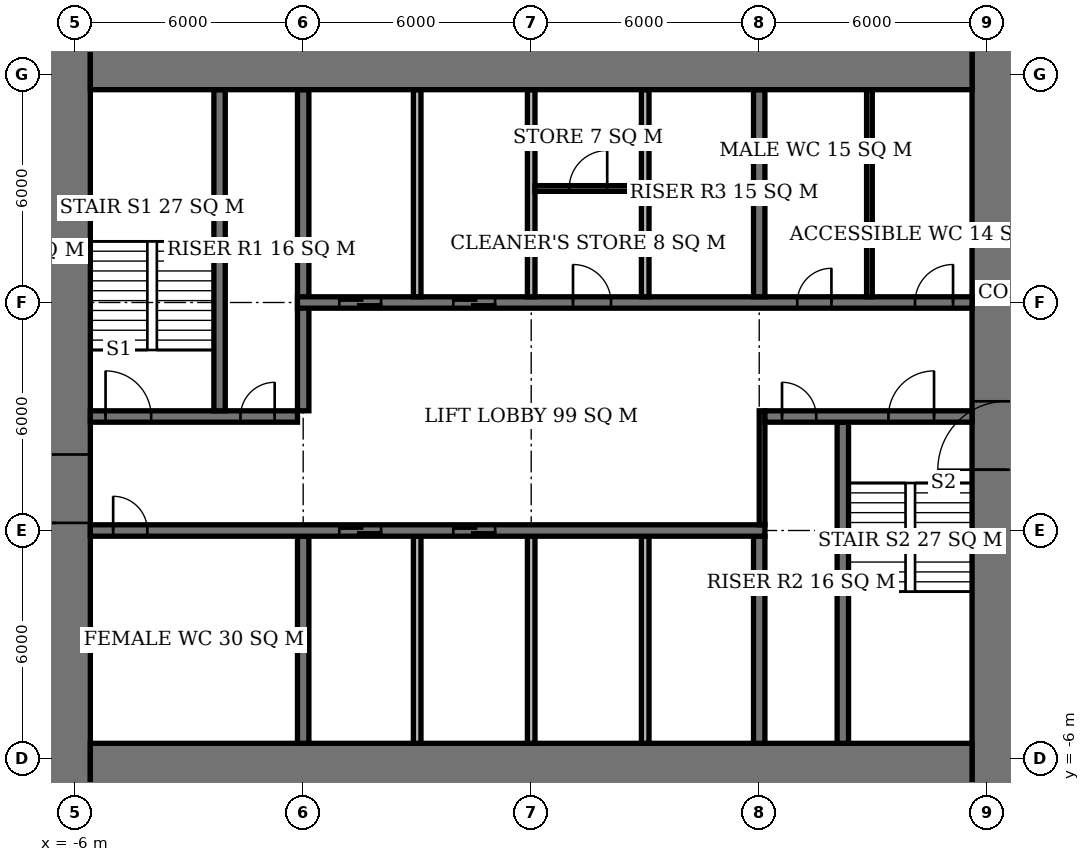
"""IFC4 building model, lengths in metres.
Left out: names, types, materials, properties, quantities, classifications, styles, units other than length and angle.
Written with IfcOpenShell. Run it as: python <this file> out.ifc"""

import sys

from ifc_helpers import new_model, si_unit, direction, frame, frame_2d, origin, place, context, subcontext, project, spatial, rectangle, extrude, element, fill, save


model = new_model("IFC4")
c1 = context("Model", 3, precision=1e-05, world=origin(), true_north=direction((0.0, 1.0)))
c2 = subcontext(c1, "Body", "Model", "MODEL_VIEW")
j1 = project(units=[si_unit("LENGTHUNIT", "METRE"), si_unit("PLANEANGLEUNIT", "RADIAN")], contexts=[c1])
p1 = place(None, origin())
s1 = spatial("IfcSite", under=j1, at=p1, CompositionType="ELEMENT")
p2 = place(p1, origin())
s2 = spatial("IfcBuilding", under=s1, at=p2, CompositionType="ELEMENT")
p3 = place(p2, frame((0.0, 0.0, 160.1)))
s3 = spatial("IfcBuildingStorey", under=s2, at=p3, CompositionType="ELEMENT", Elevation=160.1)
for number, where, z_axis, x_axis in (
    (1, (-5.6, -6.6, 0.0), (0.0, 0.0, 1.0), (1.0, 0.0, 0.0)),
    (2, (-5.6, 12.6, 0.0), (0.0, 0.0, 1.0), (1.0, 0.0, 0.0)),
):
    element("IfcWall", number, at=place(p3, frame(where, z_axis=z_axis, x_axis=x_axis)), inside=s3, PredefinedType="SHEAR", context=c2, shape_type="SweptSolid", body=[
        extrude(rectangle(XDim=23.2, YDim=2.0, at=frame_2d((11.6, 0.0))), origin(), (0.0, 0.0, 1.0), 3.9),
    ])
p4 = place(p3, frame((-6.5, -7.6, 0.0), z_axis=(0.0, 0.0, 1.0), x_axis=(0.0, 1.0, 0.0)))
e3 = element("IfcWall", 3, at=p4, inside=s3, PredefinedType="SHEAR", context=c2, shape_type="SweptSolid", body=[
    extrude(rectangle(XDim=21.2, YDim=1.8, at=frame_2d((10.6, 0.0))), origin(), (0.0, 0.0, 1.0), 3.9),
])
p5 = place(p4, frame((7.8, 0.0, 0.0)))
e4 = element("IfcOpeningElement", 4, at=p5, cuts=e3, PredefinedType="OPENING", context=c2, shape_type="SweptSolid", body=[
    extrude(rectangle(XDim=1.8, YDim=2.4, at=frame_2d((0.9, 1.2))), frame((0.0, 0.91, 0.0), z_axis=(0.0, -1.0, 0.0), x_axis=(1.0, 0.0, 0.0)), (0.0, 0.0, 1.0), 1.82),
])
p6 = place(p3, frame((18.5, -7.6, 0.0), z_axis=(0.0, 0.0, 1.0), x_axis=(0.0, 1.0, 0.0)))
e5 = element("IfcWall", 5, at=p6, inside=s3, PredefinedType="SHEAR", context=c2, shape_type="SweptSolid", body=[
    extrude(rectangle(XDim=21.2, YDim=1.8, at=frame_2d((10.6, 0.0))), origin(), (0.0, 0.0, 1.0), 3.9),
])
p7 = place(p6, frame((9.2, 0.0, 0.0)))
e6 = element("IfcOpeningElement", 6, at=p7, cuts=e5, PredefinedType="OPENING", context=c2, shape_type="SweptSolid", body=[
    extrude(rectangle(XDim=1.8, YDim=2.4, at=frame_2d((0.9, 1.2))), frame((0.0, 0.91, 0.0), z_axis=(0.0, -1.0, 0.0), x_axis=(1.0, 0.0, 0.0)), (0.0, 0.0, 1.0), 1.82),
])
p8 = place(p3, frame((-5.6, 0.0, 0.0), z_axis=(0.0, 0.0, 1.0), x_axis=(1.0, 0.0, 0.0)))
e7 = element("IfcWall", 7, at=p8, inside=s3, PredefinedType="SHEAR", context=c2, shape_type="SweptSolid", body=[
    extrude(rectangle(XDim=17.75, YDim=0.3, at=frame_2d((8.875, 0.0))), origin(), (0.0, 0.0, 1.0), 3.9),
])
p9 = place(p8, frame((0.6, 0.0, 0.0)))
e8 = element("IfcOpeningElement", 8, at=p9, cuts=e7, PredefinedType="OPENING", context=c2, shape_type="SweptSolid", body=[
    extrude(rectangle(XDim=0.9, YDim=2.1, at=frame_2d((0.45, 1.05))), frame((0.0, 0.16, 0.0), z_axis=(0.0, -1.0, 0.0), x_axis=(1.0, 0.0, 0.0)), (0.0, 0.0, 1.0), 0.32),
])
p10 = place(p8, frame((6.55, 0.0, 0.0)))
e9 = element("IfcOpeningElement", 9, at=p10, cuts=e7, PredefinedType="OPENING", context=c2, shape_type="SweptSolid", body=[
    extrude(rectangle(XDim=1.1, YDim=2.1, at=frame_2d((0.55, 1.05))), frame((0.0, 0.16, 0.0), z_axis=(0.0, -1.0, 0.0), x_axis=(1.0, 0.0, 0.0)), (0.0, 0.0, 1.0), 0.32),
])
p11 = place(p8, frame((9.55, 0.0, 0.0)))
e10 = element("IfcOpeningElement", 10, at=p11, cuts=e7, PredefinedType="OPENING", context=c2, shape_type="SweptSolid", body=[
    extrude(rectangle(XDim=1.1, YDim=2.1, at=frame_2d((0.55, 1.05))), frame((0.0, 0.16, 0.0), z_axis=(0.0, -1.0, 0.0), x_axis=(1.0, 0.0, 0.0)), (0.0, 0.0, 1.0), 0.32),
])
p12 = place(p3, frame((-5.6, 3.0, 0.0), z_axis=(0.0, 0.0, 1.0), x_axis=(1.0, 0.0, 0.0)))
e11 = element("IfcWall", 11, at=p12, inside=s3, PredefinedType="SHEAR", context=c2, shape_type="SweptSolid", body=[
    extrude(rectangle(XDim=5.45, YDim=0.3, at=frame_2d((2.725, 0.0))), origin(), (0.0, 0.0, 1.0), 3.9),
])
p13 = place(p12, frame((0.4, 0.0, 0.0)))
e12 = element("IfcOpeningElement", 12, at=p13, cuts=e11, PredefinedType="OPENING", context=c2, shape_type="SweptSolid", body=[
    extrude(rectangle(XDim=1.2, YDim=2.1, at=frame_2d((0.6, 1.05))), frame((0.0, 0.16, 0.0), z_axis=(0.0, -1.0, 0.0), x_axis=(1.0, 0.0, 0.0)), (0.0, 0.0, 1.0), 0.32),
])
p14 = place(p12, frame((3.95, 0.0, 0.0)))
e13 = element("IfcOpeningElement", 13, at=p14, cuts=e11, PredefinedType="OPENING", context=c2, shape_type="SweptSolid", body=[
    extrude(rectangle(XDim=0.9, YDim=2.1, at=frame_2d((0.45, 1.05))), frame((0.0, 0.16, 0.0), z_axis=(0.0, -1.0, 0.0), x_axis=(1.0, 0.0, 0.0)), (0.0, 0.0, 1.0), 0.32),
])
p15 = place(p3, frame((12.15, 3.0, 0.0), z_axis=(0.0, 0.0, 1.0), x_axis=(1.0, 0.0, 0.0)))
e14 = element("IfcWall", 14, at=p15, inside=s3, PredefinedType="SHEAR", context=c2, shape_type="SweptSolid", body=[
    extrude(rectangle(XDim=5.45, YDim=0.3, at=frame_2d((2.725, 0.0))), origin(), (0.0, 0.0, 1.0), 3.9),
])
p16 = place(p15, frame((3.25, 0.0, 0.0)))
e15 = element("IfcOpeningElement", 15, at=p16, cuts=e14, PredefinedType="OPENING", context=c2, shape_type="SweptSolid", body=[
    extrude(rectangle(XDim=1.2, YDim=2.1, at=frame_2d((0.6, 1.05))), frame((0.0, 0.16, 0.0), z_axis=(0.0, -1.0, 0.0), x_axis=(1.0, 0.0, 0.0)), (0.0, 0.0, 1.0), 0.32),
])
p17 = place(p15, frame((0.45, 0.0, 0.0)))
e16 = element("IfcOpeningElement", 16, at=p17, cuts=e14, PredefinedType="OPENING", context=c2, shape_type="SweptSolid", body=[
    extrude(rectangle(XDim=0.9, YDim=2.1, at=frame_2d((0.45, 1.05))), frame((0.0, 0.16, 0.0), z_axis=(0.0, -1.0, 0.0), x_axis=(1.0, 0.0, 0.0)), (0.0, 0.0, 1.0), 0.32),
])
p18 = place(p3, frame((-0.15, 6.0, 0.0), z_axis=(0.0, 0.0, 1.0), x_axis=(1.0, 0.0, 0.0)))
e17 = element("IfcWall", 17, at=p18, inside=s3, PredefinedType="SHEAR", context=c2, shape_type="SweptSolid", body=[
    extrude(rectangle(XDim=17.75, YDim=0.3, at=frame_2d((8.875, 0.0))), origin(), (0.0, 0.0, 1.0), 3.9),
])
p19 = place(p18, frame((13.15, 0.0, 0.0)))
e18 = element("IfcOpeningElement", 18, at=p19, cuts=e17, PredefinedType="OPENING", context=c2, shape_type="SweptSolid", body=[
    extrude(rectangle(XDim=0.9, YDim=2.1, at=frame_2d((0.45, 1.05))), frame((0.0, 0.16, 0.0), z_axis=(0.0, -1.0, 0.0), x_axis=(1.0, 0.0, 0.0)), (0.0, 0.0, 1.0), 0.32),
])
p20 = place(p18, frame((16.25, 0.0, 0.0)))
e19 = element("IfcOpeningElement", 19, at=p20, cuts=e17, PredefinedType="OPENING", context=c2, shape_type="SweptSolid", body=[
    extrude(rectangle(XDim=1.0, YDim=2.1, at=frame_2d((0.5, 1.05))), frame((0.0, 0.16, 0.0), z_axis=(0.0, -1.0, 0.0), x_axis=(1.0, 0.0, 0.0)), (0.0, 0.0, 1.0), 0.32),
])
p21 = place(p18, frame((7.25, 0.0, 0.0)))
e20 = element("IfcOpeningElement", 20, at=p21, cuts=e17, PredefinedType="OPENING", context=c2, shape_type="SweptSolid", body=[
    extrude(rectangle(XDim=1.0, YDim=2.1, at=frame_2d((0.5, 1.05))), frame((0.0, 0.16, 0.0), z_axis=(0.0, -1.0, 0.0), x_axis=(1.0, 0.0, 0.0)), (0.0, 0.0, 1.0), 0.32),
])
p22 = place(p18, frame((1.1, 0.0, 0.0)))
e21 = element("IfcOpeningElement", 21, at=p22, cuts=e17, PredefinedType="OPENING", context=c2, shape_type="SweptSolid", body=[
    extrude(rectangle(XDim=1.1, YDim=2.1, at=frame_2d((0.55, 1.05))), frame((0.0, 0.16, 0.0), z_axis=(0.0, -1.0, 0.0), x_axis=(1.0, 0.0, 0.0)), (0.0, 0.0, 1.0), 0.32),
])
p23 = place(p18, frame((4.1, 0.0, 0.0)))
e22 = element("IfcOpeningElement", 22, at=p23, cuts=e17, PredefinedType="OPENING", context=c2, shape_type="SweptSolid", body=[
    extrude(rectangle(XDim=1.1, YDim=2.1, at=frame_2d((0.55, 1.05))), frame((0.0, 0.16, 0.0), z_axis=(0.0, -1.0, 0.0), x_axis=(1.0, 0.0, 0.0)), (0.0, 0.0, 1.0), 0.32),
])
p24 = place(p3, frame((0.0, -5.6, 0.0), z_axis=(0.0, 0.0, 1.0), x_axis=(0.0, 1.0, 0.0)))
e23 = element("IfcWall", 23, at=p24, inside=s3, PredefinedType="SHEAR", context=c2, shape_type="SweptSolid", body=[
    extrude(rectangle(XDim=5.45, YDim=0.3, at=frame_2d((2.725, 0.0))), origin(), (0.0, 0.0, 1.0), 3.9),
])
p25 = place(p3, frame((0.0, 3.15, 0.0), z_axis=(0.0, 0.0, 1.0), x_axis=(0.0, 1.0, 0.0)))
e24 = element("IfcWall", 24, at=p25, inside=s3, PredefinedType="SHEAR", context=c2, shape_type="SweptSolid", body=[
    extrude(rectangle(XDim=8.45, YDim=0.3, at=frame_2d((4.225, 0.0))), origin(), (0.0, 0.0, 1.0), 3.9),
])
for number, where, z_axis, x_axis in (
    (25, (12.0, -5.6, 0.0), (0.0, 0.0, 1.0), (0.0, 1.0, 0.0)),
    (26, (12.0, 6.15, 0.0), (0.0, 0.0, 1.0), (0.0, 1.0, 0.0)),
):
    element("IfcWall", number, at=place(p3, frame(where, z_axis=z_axis, x_axis=x_axis)), inside=s3, PredefinedType="SHEAR", context=c2, shape_type="SweptSolid", body=[
        extrude(rectangle(XDim=5.45, YDim=0.3, at=frame_2d((2.725, 0.0))), origin(), (0.0, 0.0, 1.0), 3.9),
    ])
for number, where, z_axis, x_axis in (
    (27, (-2.2, 3.15, 0.0), (0.0, 0.0, 1.0), (0.0, 1.0, 0.0)),
    (28, (14.2, -5.6, 0.0), (0.0, 0.0, 1.0), (0.0, 1.0, 0.0)),
):
    element("IfcWall", number, at=place(p3, frame(where, z_axis=z_axis, x_axis=x_axis)), inside=s3, PredefinedType="SHEAR", context=c2, shape_type="SweptSolid", body=[
        extrude(rectangle(XDim=8.45, YDim=0.3, at=frame_2d((4.225, 0.0))), origin(), (0.0, 0.0, 1.0), 3.9),
    ])
for number, where, z_axis, x_axis in (
    (29, (3.0, 6.15, 0.0), (0.0, 0.0, 1.0), (0.0, 1.0, 0.0)),
    (30, (6.0, 6.15, 0.0), (0.0, 0.0, 1.0), (0.0, 1.0, 0.0)),
    (31, (9.0, 6.15, 0.0), (0.0, 0.0, 1.0), (0.0, 1.0, 0.0)),
    (32, (3.0, -5.6, 0.0), (0.0, 0.0, 1.0), (0.0, 1.0, 0.0)),
    (33, (6.0, -5.6, 0.0), (0.0, 0.0, 1.0), (0.0, 1.0, 0.0)),
    (34, (9.0, -5.6, 0.0), (0.0, 0.0, 1.0), (0.0, 1.0, 0.0)),
):
    element("IfcWall", number, at=place(p3, frame(where, z_axis=z_axis, x_axis=x_axis)), inside=s3, PredefinedType="SOLIDWALL", context=c2, shape_type="SweptSolid", body=[
        extrude(rectangle(XDim=5.45, YDim=0.2, at=frame_2d((2.725, 0.0))), origin(), (0.0, 0.0, 1.0), 3.9),
    ])
p26 = place(p3, frame((14.9, 6.15, 0.0), z_axis=(0.0, 0.0, 1.0), x_axis=(0.0, 1.0, 0.0)))
e35 = element("IfcWall", 35, at=p26, inside=s3, PredefinedType="PLUMBINGWALL", context=c2, shape_type="SweptSolid", body=[
    extrude(rectangle(XDim=5.45, YDim=0.15, at=frame_2d((2.725, 0.0))), origin(), (0.0, 0.0, 1.0), 3.65),
])
p27 = place(p3, frame((6.1, 9.0, 0.0), z_axis=(0.0, 0.0, 1.0), x_axis=(1.0, 0.0, 0.0)))
e36 = element("IfcWall", 36, at=p27, inside=s3, PredefinedType="PARTITIONING", context=c2, shape_type="SweptSolid", body=[
    extrude(rectangle(XDim=2.8, YDim=0.15, at=frame_2d((1.4, 0.0))), origin(), (0.0, 0.0, 1.0), 3.65),
])
p28 = place(p27, frame((0.9, 0.0, 0.0)))
e37 = element("IfcOpeningElement", 37, at=p28, cuts=e36, PredefinedType="OPENING", context=c2, shape_type="SweptSolid", body=[
    extrude(rectangle(XDim=1.0, YDim=2.1, at=frame_2d((0.5, 1.05))), frame((0.0, 0.085, 0.0), z_axis=(0.0, -1.0, 0.0), x_axis=(1.0, 0.0, 0.0)), (0.0, 0.0, 1.0), 0.17),
])
p29 = place(p3, frame((12.075, 0.15, 0.0), z_axis=(0.0, 0.0, 1.0), x_axis=(0.0, 1.0, 0.0)))
e38 = element("IfcWall", 38, at=p29, inside=s3, PredefinedType="PARTITIONING", context=c2, shape_type="SweptSolid", body=[
    extrude(rectangle(XDim=3.0, YDim=0.15, at=frame_2d((1.5, 0.0))), origin(), (0.0, 0.0, 1.0), 3.65),
])
p30 = place(p5, origin())
e39 = element("IfcDoor", 39, at=p30, inside=s3, OperationType="DOUBLE_DOOR_SINGLE_SWING", PredefinedType="DOOR", context=c2, shape_type="SweptSolid", body=[
    extrude(rectangle(XDim=1.8, YDim=2.4, at=frame_2d((0.9, 1.2))), frame((0.0, 0.025, 0.0), z_axis=(0.0, -1.0, 0.0), x_axis=(1.0, 0.0, 0.0)), (0.0, 0.0, 1.0), 0.05),
])
fill(e4, e39)
p31 = place(p7, origin())
e40 = element("IfcDoor", 40, at=p31, inside=s3, OperationType="DOUBLE_DOOR_SINGLE_SWING", PredefinedType="DOOR", context=c2, shape_type="SweptSolid", body=[
    extrude(rectangle(XDim=1.8, YDim=2.4, at=frame_2d((0.9, 1.2))), frame((0.0, 0.025, 0.0), z_axis=(0.0, -1.0, 0.0), x_axis=(1.0, 0.0, 0.0)), (0.0, 0.0, 1.0), 0.05),
])
fill(e6, e40)
p32 = place(p13, origin())
e41 = element("IfcDoor", 41, at=p32, inside=s3, OperationType="SINGLE_SWING_LEFT", PredefinedType="DOOR", context=c2, shape_type="SweptSolid", body=[
    extrude(rectangle(XDim=1.2, YDim=2.1, at=frame_2d((0.6, 1.05))), frame((0.0, 0.025, 0.0), z_axis=(0.0, -1.0, 0.0), x_axis=(1.0, 0.0, 0.0)), (0.0, 0.0, 1.0), 0.05),
])
fill(e12, e41)
p33 = place(p14, origin())
e42 = element("IfcDoor", 42, at=p33, inside=s3, OperationType="SINGLE_SWING_RIGHT", PredefinedType="DOOR", context=c2, shape_type="SweptSolid", body=[
    extrude(rectangle(XDim=0.9, YDim=2.1, at=frame_2d((0.45, 1.05))), frame((0.0, 0.025, 0.0), z_axis=(0.0, -1.0, 0.0), x_axis=(1.0, 0.0, 0.0)), (0.0, 0.0, 1.0), 0.05),
])
fill(e13, e42)
p34 = place(p16, origin())
e43 = element("IfcDoor", 43, at=p34, inside=s3, OperationType="SINGLE_SWING_RIGHT", PredefinedType="DOOR", context=c2, shape_type="SweptSolid", body=[
    extrude(rectangle(XDim=1.2, YDim=2.1, at=frame_2d((0.6, 1.05))), frame((0.0, 0.025, 0.0), z_axis=(0.0, -1.0, 0.0), x_axis=(1.0, 0.0, 0.0)), (0.0, 0.0, 1.0), 0.05),
])
fill(e15, e43)
p35 = place(p17, origin())
e44 = element("IfcDoor", 44, at=p35, inside=s3, OperationType="SINGLE_SWING_LEFT", PredefinedType="DOOR", context=c2, shape_type="SweptSolid", body=[
    extrude(rectangle(XDim=0.9, YDim=2.1, at=frame_2d((0.45, 1.05))), frame((0.0, 0.025, 0.0), z_axis=(0.0, -1.0, 0.0), x_axis=(1.0, 0.0, 0.0)), (0.0, 0.0, 1.0), 0.05),
])
fill(e16, e44)
p36 = place(p9, origin())
e45 = element("IfcDoor", 45, at=p36, inside=s3, OperationType="SINGLE_SWING_LEFT", PredefinedType="DOOR", context=c2, shape_type="SweptSolid", body=[
    extrude(rectangle(XDim=0.9, YDim=2.1, at=frame_2d((0.45, 1.05))), frame((0.0, 0.025, 0.0), z_axis=(0.0, -1.0, 0.0), x_axis=(1.0, 0.0, 0.0)), (0.0, 0.0, 1.0), 0.05),
])
fill(e8, e45)
p37 = place(p19, origin())
e46 = element("IfcDoor", 46, at=p37, inside=s3, OperationType="SINGLE_SWING_RIGHT", PredefinedType="DOOR", context=c2, shape_type="SweptSolid", body=[
    extrude(rectangle(XDim=0.9, YDim=2.1, at=frame_2d((0.45, 1.05))), frame((0.0, 0.025, 0.0), z_axis=(0.0, -1.0, 0.0), x_axis=(1.0, 0.0, 0.0)), (0.0, 0.0, 1.0), 0.05),
])
fill(e18, e46)
p38 = place(p20, origin())
e47 = element("IfcDoor", 47, at=p38, inside=s3, OperationType="SINGLE_SWING_RIGHT", PredefinedType="DOOR", context=c2, shape_type="SweptSolid", body=[
    extrude(rectangle(XDim=1.0, YDim=2.1, at=frame_2d((0.5, 1.05))), frame((0.0, 0.025, 0.0), z_axis=(0.0, -1.0, 0.0), x_axis=(1.0, 0.0, 0.0)), (0.0, 0.0, 1.0), 0.05),
])
fill(e19, e47)
p39 = place(p28, origin())
e48 = element("IfcDoor", 48, at=p39, inside=s3, OperationType="SINGLE_SWING_RIGHT", PredefinedType="DOOR", context=c2, shape_type="SweptSolid", body=[
    extrude(rectangle(XDim=1.0, YDim=2.1, at=frame_2d((0.5, 1.05))), frame((0.0, 0.025, 0.0), z_axis=(0.0, -1.0, 0.0), x_axis=(1.0, 0.0, 0.0)), (0.0, 0.0, 1.0), 0.05),
])
fill(e37, e48)
p40 = place(p21, origin())
e49 = element("IfcDoor", 49, at=p40, inside=s3, OperationType="SINGLE_SWING_LEFT", PredefinedType="DOOR", context=c2, shape_type="SweptSolid", body=[
    extrude(rectangle(XDim=1.0, YDim=2.1, at=frame_2d((0.5, 1.05))), frame((0.0, 0.025, 0.0), z_axis=(0.0, -1.0, 0.0), x_axis=(1.0, 0.0, 0.0)), (0.0, 0.0, 1.0), 0.05),
])
fill(e20, e49)
p41 = place(p22, origin())
e50 = element("IfcDoor", 50, at=p41, inside=s3, OperationType="DOUBLE_DOOR_SLIDING", PredefinedType="USERDEFINED", context=c2, shape_type="SweptSolid", body=[
    extrude(rectangle(XDim=1.1, YDim=2.1, at=frame_2d((0.55, 1.05))), frame((0.0, 0.025, 0.0), z_axis=(0.0, -1.0, 0.0), x_axis=(1.0, 0.0, 0.0)), (0.0, 0.0, 1.0), 0.05),
])
fill(e21, e50)
p42 = place(p23, origin())
e51 = element("IfcDoor", 51, at=p42, inside=s3, OperationType="DOUBLE_DOOR_SLIDING", PredefinedType="USERDEFINED", context=c2, shape_type="SweptSolid", body=[
    extrude(rectangle(XDim=1.1, YDim=2.1, at=frame_2d((0.55, 1.05))), frame((0.0, 0.025, 0.0), z_axis=(0.0, -1.0, 0.0), x_axis=(1.0, 0.0, 0.0)), (0.0, 0.0, 1.0), 0.05),
])
fill(e22, e51)
p43 = place(p10, origin())
e52 = element("IfcDoor", 52, at=p43, inside=s3, OperationType="DOUBLE_DOOR_SLIDING", PredefinedType="USERDEFINED", context=c2, shape_type="SweptSolid", body=[
    extrude(rectangle(XDim=1.1, YDim=2.1, at=frame_2d((0.55, 1.05))), frame((0.0, 0.025, 0.0), z_axis=(0.0, -1.0, 0.0), x_axis=(1.0, 0.0, 0.0)), (0.0, 0.0, 1.0), 0.05),
])
fill(e9, e52)
p44 = place(p11, origin())
e53 = element("IfcDoor", 53, at=p44, inside=s3, OperationType="DOUBLE_DOOR_SLIDING", PredefinedType="USERDEFINED", context=c2, shape_type="SweptSolid", body=[
    extrude(rectangle(XDim=1.1, YDim=2.1, at=frame_2d((0.55, 1.05))), frame((0.0, 0.025, 0.0), z_axis=(0.0, -1.0, 0.0), x_axis=(1.0, 0.0, 0.0)), (0.0, 0.0, 1.0), 0.05),
])
fill(e10, e53)
save(model, sys.argv[1])
